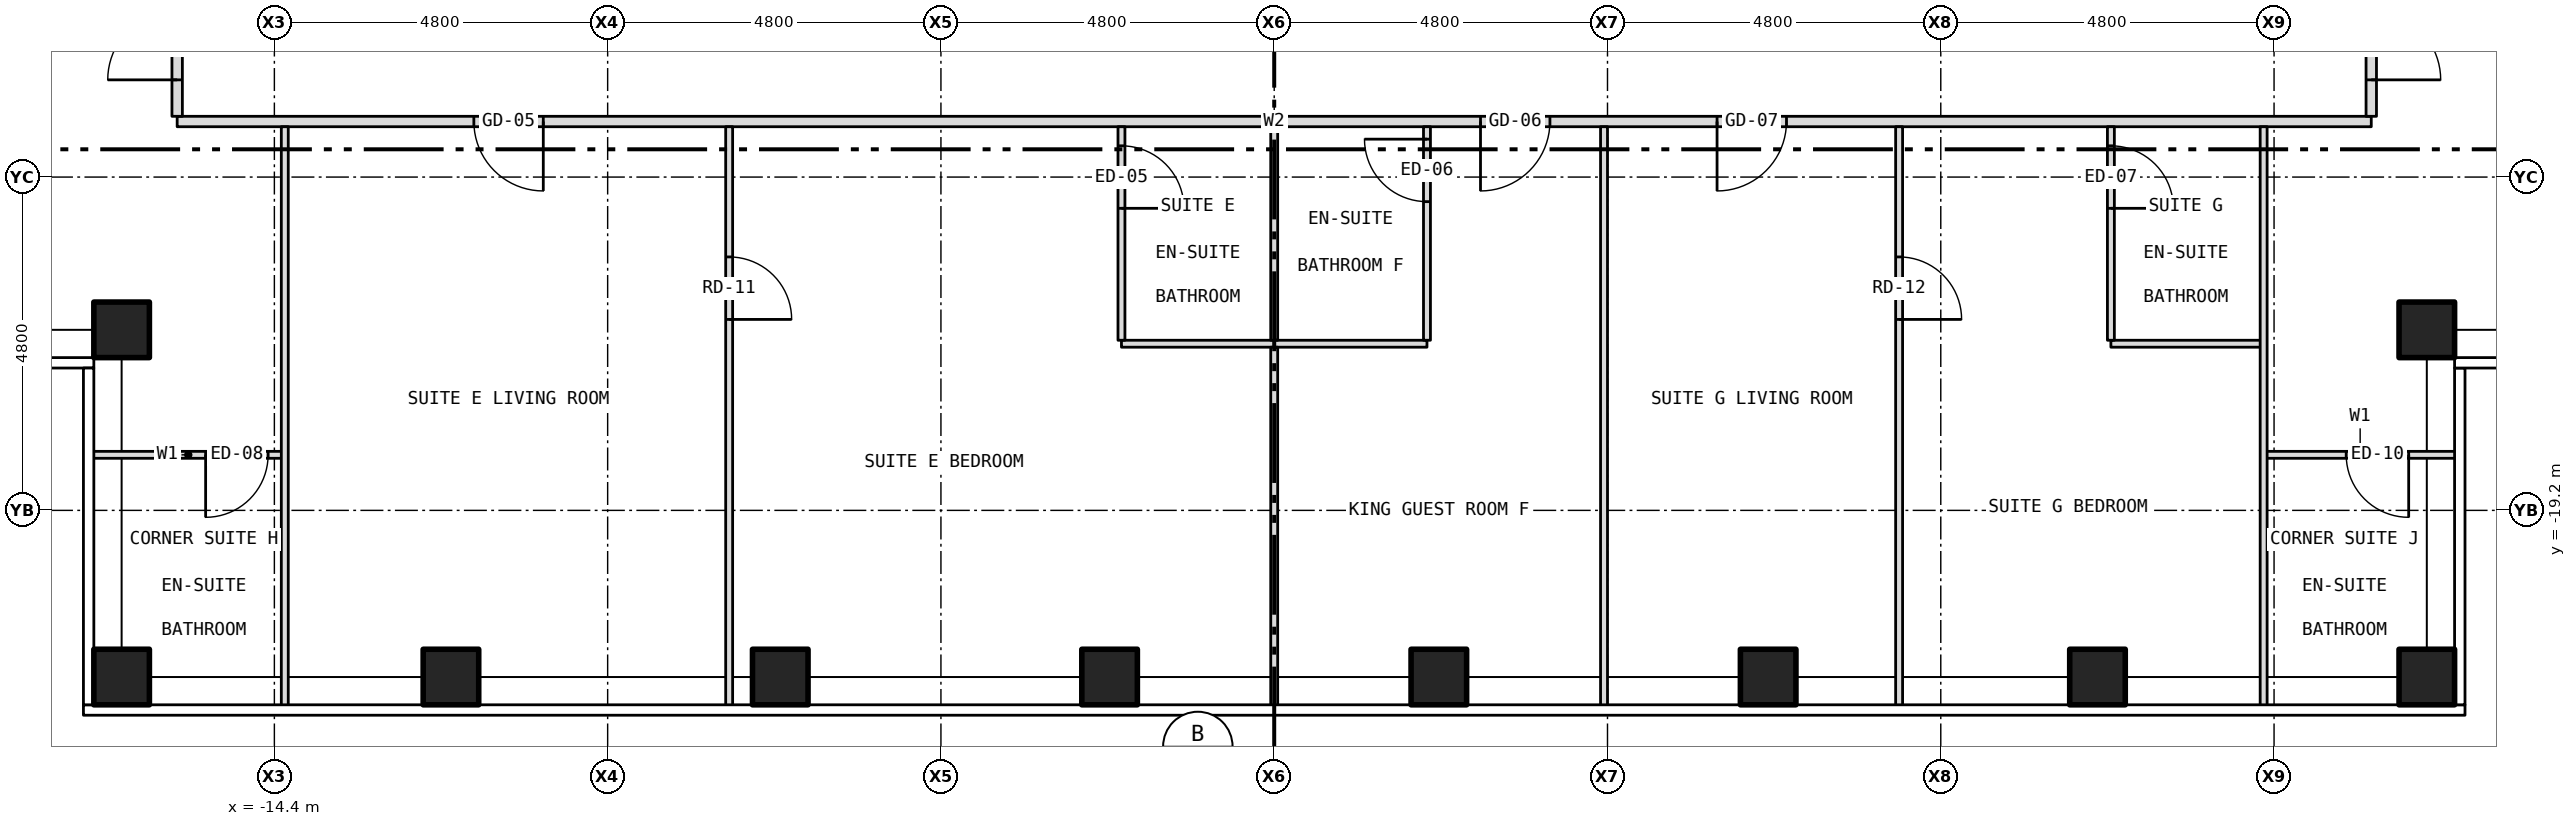
"""IFC4 building model, lengths in metres.
Left out: names, types, materials, properties, quantities, classifications, styles, units other than length and angle.
Written with IfcOpenShell. Run it as: python <this file> out.ifc"""

import sys

from ifc_helpers import new_model, si_unit, direction, frame, frame_2d, origin, origin_2d, place, context, subcontext, project, spatial, rectangle, hollow_rectangle, extrude, element, fill, save


model = new_model("IFC4")
c1 = context("Model", 3, precision=1e-05, world=origin(), true_north=direction((0.0, 1.0)))
c2 = subcontext(c1, "Body", "Model", "MODEL_VIEW")
j1 = project(units=[si_unit("LENGTHUNIT", "METRE"), si_unit("PLANEANGLEUNIT", "RADIAN")], contexts=[c1])
p1 = place(None, origin())
s1 = spatial("IfcSite", under=j1, at=p1, CompositionType="ELEMENT")
p2 = place(p1, origin())
s2 = spatial("IfcBuilding", under=s1, at=p2, CompositionType="ELEMENT")
p3 = place(p2, frame((0.0, 0.0, 165.5)))
s3 = spatial("IfcBuildingStorey", under=s2, at=p3, CompositionType="ELEMENT", Elevation=165.5)
for number, where, z_axis, x_axis in (
    (1, (-16.6, -21.6, -0.15), (0.0, 0.0, 1.0), (1.0, 0.0, 0.0)),
    (2, (-11.857, -21.6, -0.15), (0.0, 0.0, 1.0), (1.0, 0.0, 0.0)),
    (3, (-7.114, -21.6, -0.15), (0.0, 0.0, 1.0), (1.0, 0.0, 0.0)),
    (4, (-2.371, -21.6, -0.15), (0.0, 0.0, 1.0), (1.0, 0.0, 0.0)),
    (5, (2.371, -21.6, -0.15), (0.0, 0.0, 1.0), (1.0, 0.0, 0.0)),
    (6, (7.114, -21.6, -0.15), (0.0, 0.0, 1.0), (1.0, 0.0, 0.0)),
    (7, (11.857, -21.6, -0.15), (0.0, 0.0, 1.0), (1.0, 0.0, 0.0)),
    (8, (16.6, -21.6, -0.15), (0.0, 0.0, 1.0), (1.0, 0.0, 0.0)),
    (9, (-16.6, -16.6, -0.15), (0.0, 0.0, 1.0), (1.0, 0.0, 0.0)),
    (10, (16.6, -16.6, -0.15), (0.0, 0.0, 1.0), (1.0, 0.0, 0.0)),
):
    element("IfcColumn", number, at=place(p3, frame(where, z_axis=z_axis, x_axis=x_axis)), inside=s3, PredefinedType="COLUMN", context=c2, shape_type="SweptSolid", body=[
        extrude(hollow_rectangle(XDim=0.8, YDim=0.8, WallThickness=0.045, at=origin_2d()), origin(), (0.0, 0.0, 1.0), 3.5),
    ])
p4 = place(p3, frame((-17.03, -18.4, 0.0), z_axis=(0.0, 0.0, 1.0), x_axis=(1.0, 0.0, 0.0)))
e11 = element("IfcWall", 11, at=p4, inside=s3, PredefinedType="PARTITIONING", context=c2, shape_type="SweptSolid", body=[
    extrude(rectangle(XDim=2.78, YDim=0.1, at=frame_2d((1.39, 0.0))), origin(), (0.0, 0.0, 1.0), 3.35),
])
p5 = place(p4, frame((1.64, 0.0, 0.0)))
e12 = element("IfcOpeningElement", 12, at=p5, cuts=e11, PredefinedType="OPENING", context=c2, shape_type="SweptSolid", body=[
    extrude(rectangle(XDim=0.9, YDim=2.1, at=frame_2d((0.45, 1.05))), frame((0.0, 0.062, 0.0), z_axis=(0.0, -1.0, 0.0), x_axis=(1.0, 0.0, 0.0)), (0.0, 0.0, 1.0), 0.124),
])
p6 = place(p3, frame((14.25, -18.4, 0.0), z_axis=(0.0, 0.0, 1.0), x_axis=(1.0, 0.0, 0.0)))
e13 = element("IfcWall", 13, at=p6, inside=s3, PredefinedType="PARTITIONING", context=c2, shape_type="SweptSolid", body=[
    extrude(rectangle(XDim=2.78, YDim=0.1, at=frame_2d((1.39, 0.0))), origin(), (0.0, 0.0, 1.0), 3.35),
])
p7 = place(p6, frame((1.189, 0.0, 0.0)))
e14 = element("IfcOpeningElement", 14, at=p7, cuts=e13, PredefinedType="OPENING", context=c2, shape_type="SweptSolid", body=[
    extrude(rectangle(XDim=0.9, YDim=2.1, at=frame_2d((0.45, 1.05))), frame((0.0, 0.062, 0.0), z_axis=(0.0, -1.0, 0.0), x_axis=(1.0, 0.0, 0.0)), (0.0, 0.0, 1.0), 0.124),
])
p8 = place(p3, frame((-2.2, -16.8, 0.0), z_axis=(0.0, 0.0, 1.0), x_axis=(1.0, 0.0, 0.0)))
e15 = element("IfcWall", 15, at=p8, inside=s3, PredefinedType="PARTITIONING", context=c2, shape_type="SweptSolid", body=[
    extrude(rectangle(XDim=4.4, YDim=0.1, at=frame_2d((2.2, 0.0))), origin(), (0.0, 0.0, 1.0), 3.35),
])
p9 = place(p3, frame((12.05, -16.8, 0.0), z_axis=(0.0, 0.0, 1.0), x_axis=(1.0, 0.0, 0.0)))
e16 = element("IfcWall", 16, at=p9, inside=s3, PredefinedType="PARTITIONING", context=c2, shape_type="SweptSolid", body=[
    extrude(rectangle(XDim=2.2, YDim=0.1, at=frame_2d((1.1, 0.0))), origin(), (0.0, 0.0, 1.0), 3.35),
])
p10 = place(p3, frame((-15.8, -13.6, 0.0), z_axis=(0.0, 0.0, 1.0), x_axis=(1.0, 0.0, 0.0)))
e17 = element("IfcWall", 17, at=p10, inside=s3, PredefinedType="PARTITIONING", context=c2, shape_type="SweptSolid", body=[
    extrude(rectangle(XDim=31.6, YDim=0.15, at=frame_2d((15.8, 0.0))), origin(), (0.0, 0.0, 1.0), 3.35),
])
p11 = place(p10, frame((4.273, 0.0, 0.0)))
e18 = element("IfcOpeningElement", 18, at=p11, cuts=e17, PredefinedType="OPENING", context=c2, shape_type="SweptSolid", body=[
    extrude(rectangle(XDim=1.0, YDim=2.1, at=frame_2d((0.5, 1.05))), frame((0.0, 0.087, 0.0), z_axis=(0.0, -1.0, 0.0), x_axis=(1.0, 0.0, 0.0)), (0.0, 0.0, 1.0), 0.174),
])
p12 = place(p10, frame((18.771, 0.0, 0.0)))
e19 = element("IfcOpeningElement", 19, at=p12, cuts=e17, PredefinedType="OPENING", context=c2, shape_type="SweptSolid", body=[
    extrude(rectangle(XDim=1.0, YDim=2.1, at=frame_2d((0.5, 1.05))), frame((0.0, 0.087, 0.0), z_axis=(0.0, -1.0, 0.0), x_axis=(1.0, 0.0, 0.0)), (0.0, 0.0, 1.0), 0.174),
])
p13 = place(p10, frame((22.178, 0.0, 0.0)))
e20 = element("IfcOpeningElement", 20, at=p13, cuts=e17, PredefinedType="OPENING", context=c2, shape_type="SweptSolid", body=[
    extrude(rectangle(XDim=1.0, YDim=2.1, at=frame_2d((0.5, 1.05))), frame((0.0, 0.087, 0.0), z_axis=(0.0, -1.0, 0.0), x_axis=(1.0, 0.0, 0.0)), (0.0, 0.0, 1.0), 0.174),
])
p14 = place(p3, frame((-15.8, -13.525, 0.0), z_axis=(0.0, 0.0, 1.0), x_axis=(0.0, 1.0, 0.0)))
e21 = element("IfcWall", 21, at=p14, inside=s3, PredefinedType="PARTITIONING", context=c2, shape_type="SweptSolid", body=[
    extrude(rectangle(XDim=2.605, YDim=0.15, at=frame_2d((1.302, 0.0))), origin(), (0.0, 0.0, 1.0), 3.35),
])
p15 = place(p14, frame((0.525, 0.0, 0.0)))
e22 = element("IfcOpeningElement", 22, at=p15, cuts=e21, PredefinedType="OPENING", context=c2, shape_type="SweptSolid", body=[
    extrude(rectangle(XDim=1.0, YDim=2.1, at=frame_2d((0.5, 1.05))), frame((0.0, 0.087, 0.0), z_axis=(0.0, -1.0, 0.0), x_axis=(1.0, 0.0, 0.0)), (0.0, 0.0, 1.0), 0.174),
])
p16 = place(p3, frame((-14.25, -22.03, 0.0), z_axis=(0.0, 0.0, 1.0), x_axis=(0.0, 1.0, 0.0)))
e23 = element("IfcWall", 23, at=p16, inside=s3, PredefinedType="PARTITIONING", context=c2, shape_type="SweptSolid", body=[
    extrude(rectangle(XDim=8.355, YDim=0.1, at=frame_2d((4.177, 0.0))), origin(), (0.0, 0.0, 1.0), 2.817),
])
p17 = place(p3, frame((-7.85, -22.03, 0.0), z_axis=(0.0, 0.0, 1.0), x_axis=(0.0, 1.0, 0.0)))
e24 = element("IfcWall", 24, at=p17, inside=s3, PredefinedType="PARTITIONING", context=c2, shape_type="SweptSolid", body=[
    extrude(rectangle(XDim=8.355, YDim=0.1, at=frame_2d((4.177, 0.0))), origin(), (0.0, 0.0, 1.0), 3.35),
])
p18 = place(p17, frame((5.58, 0.0, 0.0)))
e25 = element("IfcOpeningElement", 25, at=p18, cuts=e24, PredefinedType="OPENING", context=c2, shape_type="SweptSolid", body=[
    extrude(rectangle(XDim=0.9, YDim=2.1, at=frame_2d((0.45, 1.05))), frame((0.0, 0.062, 0.0), z_axis=(0.0, -1.0, 0.0), x_axis=(1.0, 0.0, 0.0)), (0.0, 0.0, 1.0), 0.124),
])
p19 = place(p3, frame((-2.2, -16.75, 0.0), z_axis=(0.0, 0.0, 1.0), x_axis=(0.0, 1.0, 0.0)))
e26 = element("IfcWall", 26, at=p19, inside=s3, PredefinedType="PARTITIONING", context=c2, shape_type="SweptSolid", body=[
    extrude(rectangle(XDim=3.075, YDim=0.1, at=frame_2d((1.538, 0.0))), origin(), (0.0, 0.0, 1.0), 3.35),
])
p20 = place(p19, frame((1.9, 0.0, 0.0)))
e27 = element("IfcOpeningElement", 27, at=p20, cuts=e26, PredefinedType="OPENING", context=c2, shape_type="SweptSolid", body=[
    extrude(rectangle(XDim=0.9, YDim=2.1, at=frame_2d((0.45, 1.05))), frame((0.0, 0.062, 0.0), z_axis=(0.0, -1.0, 0.0), x_axis=(1.0, 0.0, 0.0)), (0.0, 0.0, 1.0), 0.124),
])
p21 = place(p3, frame((0.0, -22.03, 0.0), z_axis=(0.0, 0.0, 1.0), x_axis=(0.0, 1.0, 0.0)))
e28 = element("IfcWall", 28, at=p21, inside=s3, PredefinedType="PARTITIONING", context=c2, shape_type="SweptSolid", body=[
    extrude(rectangle(XDim=5.18, YDim=0.1, at=frame_2d((2.59, 0.0))), origin(), (0.0, 0.0, 1.0), 2.728),
])
p22 = place(p3, frame((0.0, -16.75, 0.0), z_axis=(0.0, 0.0, 1.0), x_axis=(0.0, 1.0, 0.0)))
e29 = element("IfcWall", 29, at=p22, inside=s3, PredefinedType="PARTITIONING", context=c2, shape_type="SweptSolid", body=[
    extrude(rectangle(XDim=3.075, YDim=0.1, at=frame_2d((1.538, 0.0))), origin(), (0.0, 0.0, 1.0), 2.728),
])
p23 = place(p3, frame((2.2, -16.75, 0.0), z_axis=(0.0, 0.0, 1.0), x_axis=(0.0, 1.0, 0.0)))
e30 = element("IfcWall", 30, at=p23, inside=s3, PredefinedType="PARTITIONING", context=c2, shape_type="SweptSolid", body=[
    extrude(rectangle(XDim=3.075, YDim=0.1, at=frame_2d((1.538, 0.0))), origin(), (0.0, 0.0, 1.0), 3.35),
])
p24 = place(p23, frame((1.996, 0.0, 0.0)))
e31 = element("IfcOpeningElement", 31, at=p24, cuts=e30, PredefinedType="OPENING", context=c2, shape_type="SweptSolid", body=[
    extrude(rectangle(XDim=0.9, YDim=2.1, at=frame_2d((0.45, 1.05))), frame((0.0, 0.062, 0.0), z_axis=(0.0, -1.0, 0.0), x_axis=(1.0, 0.0, 0.0)), (0.0, 0.0, 1.0), 0.124),
])
p25 = place(p3, frame((4.75, -22.03, 0.0), z_axis=(0.0, 0.0, 1.0), x_axis=(0.0, 1.0, 0.0)))
e32 = element("IfcWall", 32, at=p25, inside=s3, PredefinedType="PARTITIONING", context=c2, shape_type="SweptSolid", body=[
    extrude(rectangle(XDim=8.355, YDim=0.1, at=frame_2d((4.177, 0.0))), origin(), (0.0, 0.0, 1.0), 2.817),
])
p26 = place(p3, frame((9.0, -22.03, 0.0), z_axis=(0.0, 0.0, 1.0), x_axis=(0.0, 1.0, 0.0)))
e33 = element("IfcWall", 33, at=p26, inside=s3, PredefinedType="PARTITIONING", context=c2, shape_type="SweptSolid", body=[
    extrude(rectangle(XDim=8.355, YDim=0.1, at=frame_2d((4.177, 0.0))), origin(), (0.0, 0.0, 1.0), 3.35),
])
p27 = place(p26, frame((5.58, 0.0, 0.0)))
e34 = element("IfcOpeningElement", 34, at=p27, cuts=e33, PredefinedType="OPENING", context=c2, shape_type="SweptSolid", body=[
    extrude(rectangle(XDim=0.9, YDim=2.1, at=frame_2d((0.45, 1.05))), frame((0.0, 0.062, 0.0), z_axis=(0.0, -1.0, 0.0), x_axis=(1.0, 0.0, 0.0)), (0.0, 0.0, 1.0), 0.124),
])
p28 = place(p3, frame((12.05, -16.75, 0.0), z_axis=(0.0, 0.0, 1.0), x_axis=(0.0, 1.0, 0.0)))
e35 = element("IfcWall", 35, at=p28, inside=s3, PredefinedType="PARTITIONING", context=c2, shape_type="SweptSolid", body=[
    extrude(rectangle(XDim=3.075, YDim=0.1, at=frame_2d((1.538, 0.0))), origin(), (0.0, 0.0, 1.0), 3.35),
])
p29 = place(p28, frame((1.9, 0.0, 0.0)))
e36 = element("IfcOpeningElement", 36, at=p29, cuts=e35, PredefinedType="OPENING", context=c2, shape_type="SweptSolid", body=[
    extrude(rectangle(XDim=0.9, YDim=2.1, at=frame_2d((0.45, 1.05))), frame((0.0, 0.062, 0.0), z_axis=(0.0, -1.0, 0.0), x_axis=(1.0, 0.0, 0.0)), (0.0, 0.0, 1.0), 0.124),
])
p30 = place(p3, frame((14.25, -22.03, 0.0), z_axis=(0.0, 0.0, 1.0), x_axis=(0.0, 1.0, 0.0)))
e37 = element("IfcWall", 37, at=p30, inside=s3, PredefinedType="PARTITIONING", context=c2, shape_type="SweptSolid", body=[
    extrude(rectangle(XDim=8.355, YDim=0.1, at=frame_2d((4.177, 0.0))), origin(), (0.0, 0.0, 1.0), 2.817),
])
p31 = place(p3, frame((15.8, -13.525, 0.0), z_axis=(0.0, 0.0, 1.0), x_axis=(0.0, 1.0, 0.0)))
e38 = element("IfcWall", 38, at=p31, inside=s3, PredefinedType="PARTITIONING", context=c2, shape_type="SweptSolid", body=[
    extrude(rectangle(XDim=2.605, YDim=0.15, at=frame_2d((1.302, 0.0))), origin(), (0.0, 0.0, 1.0), 3.35),
])
p32 = place(p31, frame((0.525, 0.0, 0.0)))
e39 = element("IfcOpeningElement", 39, at=p32, cuts=e38, PredefinedType="OPENING", context=c2, shape_type="SweptSolid", body=[
    extrude(rectangle(XDim=1.0, YDim=2.1, at=frame_2d((0.5, 1.05))), frame((0.0, 0.087, 0.0), z_axis=(0.0, -1.0, 0.0), x_axis=(1.0, 0.0, 0.0)), (0.0, 0.0, 1.0), 0.174),
])
p33 = place(p11, origin())
e40 = element("IfcDoor", 40, at=p33, inside=s3, OperationType="SINGLE_SWING_RIGHT", PredefinedType="DOOR", context=c2, shape_type="SweptSolid", body=[
    extrude(rectangle(XDim=1.0, YDim=2.1, at=frame_2d((0.5, 1.05))), frame((0.0, 0.025, 0.0), z_axis=(0.0, -1.0, 0.0), x_axis=(1.0, 0.0, 0.0)), (0.0, 0.0, 1.0), 0.05),
])
fill(e18, e40)
p34 = place(p18, origin())
e41 = element("IfcDoor", 41, at=p34, inside=s3, OperationType="SINGLE_SWING_LEFT", PredefinedType="DOOR", context=c2, shape_type="SweptSolid", body=[
    extrude(rectangle(XDim=0.9, YDim=2.1, at=frame_2d((0.45, 1.05))), frame((0.0, 0.025, 0.0), z_axis=(0.0, -1.0, 0.0), x_axis=(1.0, 0.0, 0.0)), (0.0, 0.0, 1.0), 0.05),
])
fill(e25, e41)
p35 = place(p20, origin())
e42 = element("IfcDoor", 42, at=p35, inside=s3, OperationType="SINGLE_SWING_LEFT", PredefinedType="DOOR", context=c2, shape_type="SweptSolid", body=[
    extrude(rectangle(XDim=0.9, YDim=2.1, at=frame_2d((0.45, 1.05))), frame((0.0, 0.025, 0.0), z_axis=(0.0, -1.0, 0.0), x_axis=(1.0, 0.0, 0.0)), (0.0, 0.0, 1.0), 0.05),
])
fill(e27, e42)
p36 = place(p12, origin())
e43 = element("IfcDoor", 43, at=p36, inside=s3, OperationType="SINGLE_SWING_LEFT", PredefinedType="DOOR", context=c2, shape_type="SweptSolid", body=[
    extrude(rectangle(XDim=1.0, YDim=2.1, at=frame_2d((0.5, 1.05))), frame((0.0, 0.025, 0.0), z_axis=(0.0, -1.0, 0.0), x_axis=(1.0, 0.0, 0.0)), (0.0, 0.0, 1.0), 0.05),
])
fill(e19, e43)
p37 = place(p24, origin())
e44 = element("IfcDoor", 44, at=p37, inside=s3, OperationType="SINGLE_SWING_RIGHT", PredefinedType="DOOR", context=c2, shape_type="SweptSolid", body=[
    extrude(rectangle(XDim=0.9, YDim=2.1, at=frame_2d((0.45, 1.05))), frame((0.0, 0.025, 0.0), z_axis=(0.0, -1.0, 0.0), x_axis=(1.0, 0.0, 0.0)), (0.0, 0.0, 1.0), 0.05),
])
fill(e31, e44)
p38 = place(p13, origin())
e45 = element("IfcDoor", 45, at=p38, inside=s3, OperationType="SINGLE_SWING_LEFT", PredefinedType="DOOR", context=c2, shape_type="SweptSolid", body=[
    extrude(rectangle(XDim=1.0, YDim=2.1, at=frame_2d((0.5, 1.05))), frame((0.0, 0.025, 0.0), z_axis=(0.0, -1.0, 0.0), x_axis=(1.0, 0.0, 0.0)), (0.0, 0.0, 1.0), 0.05),
])
fill(e20, e45)
p39 = place(p27, origin())
e46 = element("IfcDoor", 46, at=p39, inside=s3, OperationType="SINGLE_SWING_LEFT", PredefinedType="DOOR", context=c2, shape_type="SweptSolid", body=[
    extrude(rectangle(XDim=0.9, YDim=2.1, at=frame_2d((0.45, 1.05))), frame((0.0, 0.025, 0.0), z_axis=(0.0, -1.0, 0.0), x_axis=(1.0, 0.0, 0.0)), (0.0, 0.0, 1.0), 0.05),
])
fill(e34, e46)
p40 = place(p29, origin())
e47 = element("IfcDoor", 47, at=p40, inside=s3, OperationType="SINGLE_SWING_LEFT", PredefinedType="DOOR", context=c2, shape_type="SweptSolid", body=[
    extrude(rectangle(XDim=0.9, YDim=2.1, at=frame_2d((0.45, 1.05))), frame((0.0, 0.025, 0.0), z_axis=(0.0, -1.0, 0.0), x_axis=(1.0, 0.0, 0.0)), (0.0, 0.0, 1.0), 0.05),
])
fill(e36, e47)
p41 = place(p5, origin())
e48 = element("IfcDoor", 48, at=p41, inside=s3, OperationType="SINGLE_SWING_LEFT", PredefinedType="DOOR", context=c2, shape_type="SweptSolid", body=[
    extrude(rectangle(XDim=0.9, YDim=2.1, at=frame_2d((0.45, 1.05))), frame((0.0, 0.025, 0.0), z_axis=(0.0, -1.0, 0.0), x_axis=(1.0, 0.0, 0.0)), (0.0, 0.0, 1.0), 0.05),
])
fill(e12, e48)
p42 = place(p15, origin())
e49 = element("IfcDoor", 49, at=p42, inside=s3, OperationType="SINGLE_SWING_LEFT", PredefinedType="DOOR", context=c2, shape_type="SweptSolid", body=[
    extrude(rectangle(XDim=1.0, YDim=2.1, at=frame_2d((0.5, 1.05))), frame((0.0, 0.025, 0.0), z_axis=(0.0, -1.0, 0.0), x_axis=(1.0, 0.0, 0.0)), (0.0, 0.0, 1.0), 0.05),
])
fill(e22, e49)
p43 = place(p7, origin())
e50 = element("IfcDoor", 50, at=p43, inside=s3, OperationType="SINGLE_SWING_RIGHT", PredefinedType="DOOR", context=c2, shape_type="SweptSolid", body=[
    extrude(rectangle(XDim=0.9, YDim=2.1, at=frame_2d((0.45, 1.05))), frame((0.0, 0.025, 0.0), z_axis=(0.0, -1.0, 0.0), x_axis=(1.0, 0.0, 0.0)), (0.0, 0.0, 1.0), 0.05),
])
fill(e14, e50)
p44 = place(p32, origin())
e51 = element("IfcDoor", 51, at=p44, inside=s3, OperationType="SINGLE_SWING_LEFT", PredefinedType="DOOR", context=c2, shape_type="SweptSolid", body=[
    extrude(rectangle(XDim=1.0, YDim=2.1, at=frame_2d((0.5, 1.05))), frame((0.0, 0.025, 0.0), z_axis=(0.0, -1.0, 0.0), x_axis=(1.0, 0.0, 0.0)), (0.0, 0.0, 1.0), 0.05),
])
fill(e39, e51)
save(model, sys.argv[1])
